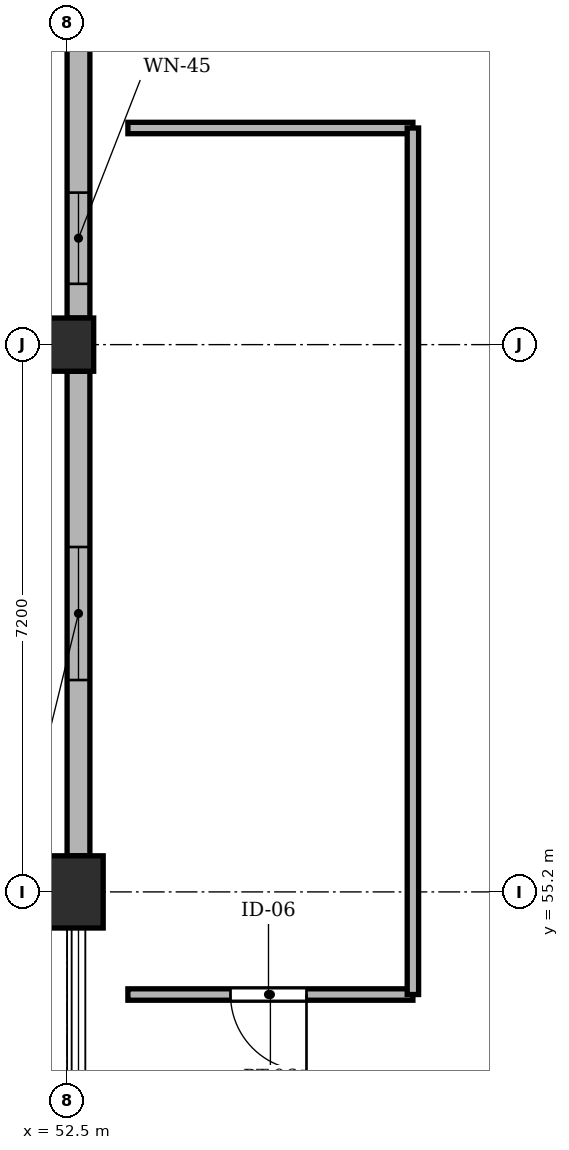
"""IFC4 building model, lengths in metres.
Left out: names, types, materials, properties, quantities, classifications, styles, units other than length and angle.
Written with IfcOpenShell. Run it as: python <this file> out.ifc"""

import sys

from ifc_helpers import new_model, si_unit, direction, frame, frame_2d, origin, origin_2d, place, context, subcontext, project, spatial, rectangle, extrude, element, fill, save


model = new_model("IFC4")
c1 = context("Model", 3, precision=1e-05, world=origin(), true_north=direction((0.0, 1.0)))
c2 = subcontext(c1, "Body", "Model", "MODEL_VIEW")
j1 = project(units=[si_unit("LENGTHUNIT", "METRE"), si_unit("PLANEANGLEUNIT", "RADIAN")], contexts=[c1])
p1 = place(None, origin())
s1 = spatial("IfcSite", under=j1, at=p1, CompositionType="ELEMENT")
p2 = place(p1, origin())
s2 = spatial("IfcBuilding", under=s1, at=p2, CompositionType="ELEMENT")
p3 = place(p2, frame((0.0, 0.0, 50.3)))
s3 = spatial("IfcBuildingStorey", under=s2, at=p3, CompositionType="ELEMENT", Elevation=50.3)
p4 = place(p3, frame((52.5, 55.2, -0.23), z_axis=(0.0, 0.0, 1.0), x_axis=(1.0, 0.0, 0.0)))
e1 = element("IfcColumn", 1, at=p4, inside=s3, PredefinedType="COLUMN", context=c2, shape_type="SweptSolid", body=[
    extrude(rectangle(XDim=0.95, YDim=0.95, at=origin_2d()), origin(), (0.0, 0.0, 1.0), 3.26),
])
p5 = place(p3, frame((52.5, 62.4, -0.23), z_axis=(0.0, 0.0, 1.0), x_axis=(1.0, 0.0, 0.0)))
e2 = element("IfcColumn", 2, at=p5, inside=s3, PredefinedType="COLUMN", context=c2, shape_type="SweptSolid", body=[
    extrude(rectangle(XDim=0.7, YDim=0.7, at=origin_2d()), origin(), (0.0, 0.0, 1.0), 3.26),
])
p6 = place(p3, frame((52.65, 68.4, 0.0), z_axis=(0.0, 0.0, 1.0), x_axis=(0.0, -1.0, 0.0)))
e3 = element("IfcWall", 3, at=p6, inside=s3, PredefinedType="SOLIDWALL", context=c2, shape_type="SweptSolid", body=[
    extrude(rectangle(XDim=5.65, YDim=0.3, at=frame_2d((2.825, 0.0))), origin(), (0.0, 0.0, 1.0), 2.53),
])
p7 = place(p6, frame((4.0, 0.0, 0.62)))
e4 = element("IfcOpeningElement", 4, at=p7, cuts=e3, PredefinedType="OPENING", context=c2, shape_type="SweptSolid", body=[
    extrude(rectangle(XDim=1.2, YDim=1.65, at=frame_2d((0.6, 0.825))), frame((0.0, 0.162, 0.0), z_axis=(0.0, -1.0, 0.0), x_axis=(1.0, 0.0, 0.0)), (0.0, 0.0, 1.0), 0.324),
])
p8 = place(p3, frame((52.65, 62.05, 0.0), z_axis=(0.0, 0.0, 1.0), x_axis=(0.0, -1.0, 0.0)))
e5 = element("IfcWall", 5, at=p8, inside=s3, PredefinedType="SOLIDWALL", context=c2, shape_type="SweptSolid", body=[
    extrude(rectangle(XDim=6.375, YDim=0.3, at=frame_2d((3.188, 0.0))), origin(), (0.0, 0.0, 1.0), 2.53),
])
p9 = place(p8, frame((2.312, 0.0, 0.62)))
e6 = element("IfcOpeningElement", 6, at=p9, cuts=e5, PredefinedType="OPENING", context=c2, shape_type="SweptSolid", body=[
    extrude(rectangle(XDim=1.75, YDim=1.81, at=frame_2d((0.875, 0.905))), frame((0.0, 0.162, 0.0), z_axis=(0.0, -1.0, 0.0), x_axis=(1.0, 0.0, 0.0)), (0.0, 0.0, 1.0), 0.324),
])
p10 = place(p3, frame((53.3, 53.85, 0.0), z_axis=(0.0, 0.0, 1.0), x_axis=(1.0, 0.0, 0.0)))
e7 = element("IfcWall", 7, at=p10, inside=s3, PredefinedType="PARTITIONING", context=c2, shape_type="SweptSolid", body=[
    extrude(rectangle(XDim=3.75, YDim=0.15, at=frame_2d((1.875, 0.0))), origin(), (0.0, 0.0, 1.0), 2.53),
])
p11 = place(p10, frame((1.35, 0.0, 0.0)))
e8 = element("IfcOpeningElement", 8, at=p11, cuts=e7, PredefinedType="OPENING", context=c2, shape_type="SweptSolid", body=[
    extrude(rectangle(XDim=1.0, YDim=2.15, at=frame_2d((0.5, 1.075))), frame((0.0, 0.087, 0.0), z_axis=(0.0, -1.0, 0.0), x_axis=(1.0, 0.0, 0.0)), (0.0, 0.0, 1.0), 0.174),
])
p12 = place(p3, frame((53.3, 65.25, 0.0), z_axis=(0.0, 0.0, 1.0), x_axis=(1.0, 0.0, 0.0)))
e9 = element("IfcWall", 9, at=p12, inside=s3, PredefinedType="PARTITIONING", context=c2, shape_type="SweptSolid", body=[
    extrude(rectangle(XDim=3.75, YDim=0.15, at=frame_2d((1.875, 0.0))), origin(), (0.0, 0.0, 1.0), 2.53),
])
p13 = place(p3, frame((57.05, 53.85, 0.0), z_axis=(0.0, 0.0, 1.0), x_axis=(0.0, 1.0, 0.0)))
e10 = element("IfcWall", 10, at=p13, inside=s3, PredefinedType="PARTITIONING", context=c2, shape_type="SweptSolid", body=[
    extrude(rectangle(XDim=11.4, YDim=0.15, at=frame_2d((5.7, 0.0))), origin(), (0.0, 0.0, 1.0), 2.53),
])
p14 = place(p7, origin())
e11 = element("IfcWindow", 11, at=p14, inside=s3, PartitioningType="SINGLE_PANEL", PredefinedType="WINDOW", context=c2, shape_type="SweptSolid", body=[
    extrude(rectangle(XDim=1.2, YDim=1.65, at=frame_2d((0.6, 0.825))), frame((0.0, 0.03, 0.0), z_axis=(0.0, -1.0, 0.0), x_axis=(1.0, 0.0, 0.0)), (0.0, 0.0, 1.0), 0.06),
])
fill(e4, e11)
p15 = place(p9, origin())
e12 = element("IfcWindow", 12, at=p15, inside=s3, PartitioningType="SINGLE_PANEL", PredefinedType="WINDOW", context=c2, shape_type="SweptSolid", body=[
    extrude(rectangle(XDim=1.75, YDim=1.81, at=frame_2d((0.875, 0.905))), frame((0.0, 0.03, 0.0), z_axis=(0.0, -1.0, 0.0), x_axis=(1.0, 0.0, 0.0)), (0.0, 0.0, 1.0), 0.06),
])
fill(e6, e12)
p16 = place(p11, frame((1.0, 0.0, 0.0), z_axis=(0.0, 0.0, 1.0), x_axis=(-1.0, 0.0, 0.0)))
e13 = element("IfcDoor", 13, at=p16, inside=s3, OperationType="SINGLE_SWING_RIGHT", PredefinedType="DOOR", context=c2, shape_type="SweptSolid", body=[
    extrude(rectangle(XDim=1.0, YDim=2.15, at=frame_2d((0.5, 1.075))), frame((0.0, 0.025, 0.0), z_axis=(0.0, -1.0, 0.0), x_axis=(1.0, 0.0, 0.0)), (0.0, 0.0, 1.0), 0.05),
])
fill(e8, e13)
save(model, sys.argv[1])
